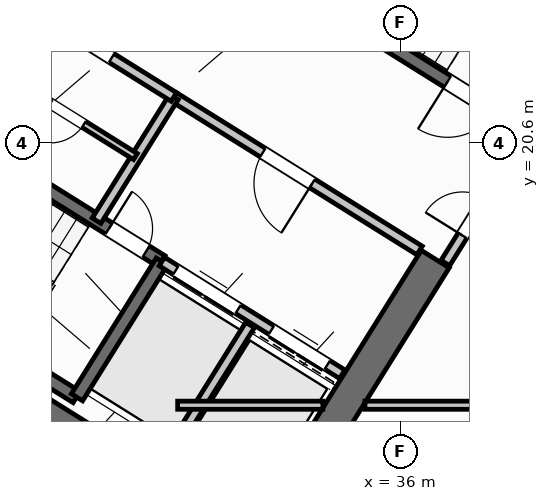
"""IFC4 building model, lengths in metres.
Left out: names, types, materials, properties, quantities, classifications, styles, units other than length and angle.
Written with IfcOpenShell. Run it as: python <this file> out.ifc"""

import sys

from ifc_helpers import new_model, si_unit, direction, frame, frame_2d, origin, place, context, subcontext, project, spatial, rectangle, extrude, source, transform, mapped, element, fill, save


model = new_model("IFC4")
c1 = context("Model", 3, precision=1e-05, world=origin(), true_north=direction((0.0, 1.0)))
c2 = subcontext(c1, "Body", "Model", "MODEL_VIEW")
j1 = project(units=[si_unit("LENGTHUNIT", "METRE"), si_unit("PLANEANGLEUNIT", "RADIAN")], contexts=[c1])
p1 = place(None, origin())
s1 = spatial("IfcSite", under=j1, at=p1, CompositionType="ELEMENT")
p2 = place(p1, origin())
s2 = spatial("IfcBuilding", under=s1, at=p2, CompositionType="ELEMENT")
p3 = place(p2, frame((0.0, 0.0, 67.2)))
s3 = spatial("IfcBuildingStorey", under=s2, at=p3, CompositionType="ELEMENT", Elevation=67.2)
p4 = place(p3, frame((33.409, 12.45, 0.0), z_axis=(0.0, 0.0, 1.0), x_axis=(-0.848051132073, 0.529914405721, 0.0)))
e1 = element("IfcWall", 1, at=p4, inside=s3, PredefinedType="SHEAR", context=c2, shape_type="SweptSolid", body=[
    extrude(rectangle(XDim=13.24, YDim=0.65, at=frame_2d((6.62, 0.0))), origin(), (0.0, 0.0, 1.0), 4.22),
])
p5 = place(p3, frame((36.683, 18.304, 0.0), z_axis=(0.0, 0.0, 1.0), x_axis=(-0.529899109053, -0.848060690178, 0.0)))
e2 = element("IfcWall", 2, at=p5, inside=s3, PredefinedType="SHEAR", context=c2, shape_type="SweptSolid", body=[
    extrude(rectangle(XDim=6.375, YDim=0.65, at=frame_2d((3.188, 0.0))), origin(), (0.0, 0.0, 1.0), 4.22),
])
p6 = place(p3, frame((29.268, 6.429, 0.0), z_axis=(0.0, 0.0, 1.0), x_axis=(-0.848049971435, 0.529916263149, 0.0)))
e3 = element("IfcWall", 3, at=p6, inside=s3, PredefinedType="STANDARD", context=c2, shape_type="SweptSolid", body=[
    extrude(rectangle(XDim=31.588, YDim=0.32, at=frame_2d((15.794, 0.0))), origin(), (0.0, 0.0, 1.0), 4.22),
])
p7 = place(p6, frame((16.362, 0.0, 0.0)))
e4 = element("IfcOpeningElement", 4, at=p7, cuts=e3, PredefinedType="OPENING", context=c2, shape_type="SweptSolid", body=[
    extrude(rectangle(XDim=1.2, YDim=2.15, at=frame_2d((0.6, 1.075))), frame((0.0, 0.17, 0.0), z_axis=(0.0, -1.0, 0.0), x_axis=(1.0, 0.0, 0.0)), (0.0, 0.0, 1.0), 0.34),
])
p8 = place(p6, frame((2.989, 0.0, 0.8)))
e5 = element("IfcOpeningElement", 5, at=p8, cuts=e3, PredefinedType="OPENING", context=c2, shape_type="SweptSolid", body=[
    extrude(rectangle(XDim=2.1, YDim=1.55, at=frame_2d((1.05, 0.775))), frame((0.0, 0.17, 0.0), z_axis=(0.0, -1.0, 0.0), x_axis=(1.0, 0.0, 0.0)), (0.0, 0.0, 1.0), 0.34),
])
p9 = place(p6, frame((8.359, 0.0, 0.8)))
e6 = element("IfcOpeningElement", 6, at=p9, cuts=e3, PredefinedType="OPENING", context=c2, shape_type="SweptSolid", body=[
    extrude(rectangle(XDim=2.1, YDim=1.55, at=frame_2d((1.05, 0.775))), frame((0.0, 0.17, 0.0), z_axis=(0.0, -1.0, 0.0), x_axis=(1.0, 0.0, 0.0)), (0.0, 0.0, 1.0), 0.34),
])
p10 = place(p6, frame((13.284, 0.0, 0.95)))
e7 = element("IfcOpeningElement", 7, at=p10, cuts=e3, PredefinedType="OPENING", context=c2, shape_type="SweptSolid", body=[
    extrude(rectangle(XDim=1.2, YDim=1.4, at=frame_2d((0.6, 0.7))), frame((0.0, 0.17, 0.0), z_axis=(0.0, -1.0, 0.0), x_axis=(1.0, 0.0, 0.0)), (0.0, 0.0, 1.0), 0.34),
])
p11 = place(p6, frame((29.188, 0.0, 0.95)))
e8 = element("IfcOpeningElement", 8, at=p11, cuts=e3, PredefinedType="OPENING", context=c2, shape_type="SweptSolid", body=[
    extrude(rectangle(XDim=1.2, YDim=1.4, at=frame_2d((0.6, 0.7))), frame((0.0, 0.17, 0.0), z_axis=(0.0, -1.0, 0.0), x_axis=(1.0, 0.0, 0.0)), (0.0, 0.0, 1.0), 0.34),
])
p12 = place(p6, frame((19.11, 0.0, 1.0)))
e9 = element("IfcOpeningElement", 9, at=p12, cuts=e3, PredefinedType="OPENING", context=c2, shape_type="SweptSolid", body=[
    extrude(rectangle(XDim=0.9, YDim=1.25, at=frame_2d((0.45, 0.625))), frame((0.0, 0.17, 0.0), z_axis=(0.0, -1.0, 0.0), x_axis=(1.0, 0.0, 0.0)), (0.0, 0.0, 1.0), 0.34),
])
p13 = place(p6, frame((21.226, 0.0, 1.0)))
e10 = element("IfcOpeningElement", 10, at=p13, cuts=e3, PredefinedType="OPENING", context=c2, shape_type="SweptSolid", body=[
    extrude(rectangle(XDim=0.9, YDim=1.25, at=frame_2d((0.45, 0.625))), frame((0.0, 0.17, 0.0), z_axis=(0.0, -1.0, 0.0), x_axis=(1.0, 0.0, 0.0)), (0.0, 0.0, 1.0), 0.34),
])
p14 = place(p6, frame((23.014, 0.0, 1.0)))
e11 = element("IfcOpeningElement", 11, at=p14, cuts=e3, PredefinedType="OPENING", context=c2, shape_type="SweptSolid", body=[
    extrude(rectangle(XDim=0.9, YDim=1.25, at=frame_2d((0.45, 0.625))), frame((0.0, 0.17, 0.0), z_axis=(0.0, -1.0, 0.0), x_axis=(1.0, 0.0, 0.0)), (0.0, 0.0, 1.0), 0.34),
])
p15 = place(p6, frame((24.802, 0.0, 1.0)))
e12 = element("IfcOpeningElement", 12, at=p15, cuts=e3, PredefinedType="OPENING", context=c2, shape_type="SweptSolid", body=[
    extrude(rectangle(XDim=0.9, YDim=1.25, at=frame_2d((0.45, 0.625))), frame((0.0, 0.17, 0.0), z_axis=(0.0, -1.0, 0.0), x_axis=(1.0, 0.0, 0.0)), (0.0, 0.0, 1.0), 0.34),
])
p16 = place(p6, frame((26.59, 0.0, 1.0)))
e13 = element("IfcOpeningElement", 13, at=p16, cuts=e3, PredefinedType="OPENING", context=c2, shape_type="SweptSolid", body=[
    extrude(rectangle(XDim=0.9, YDim=1.25, at=frame_2d((0.45, 0.625))), frame((0.0, 0.17, 0.0), z_axis=(0.0, -1.0, 0.0), x_axis=(1.0, 0.0, 0.0)), (0.0, 0.0, 1.0), 0.34),
])
p17 = place(p3, frame((29.605, 15.581, 0.0), z_axis=(0.0, 0.0, 1.0), x_axis=(-0.848036911448, 0.529937163087, 0.0)))
e14 = element("IfcWall", 14, at=p17, inside=s3, PredefinedType="SHEAR", context=c2, shape_type="SweptSolid", body=[
    extrude(rectangle(XDim=7.46, YDim=0.26, at=frame_2d((3.73, 0.0))), origin(), (0.0, 0.0, 1.0), 4.22),
])
p18 = place(p3, frame((31.28, 18.261, 0.0), z_axis=(0.0, 0.0, 1.0), x_axis=(-0.848051618787, 0.529913626805, 0.0)))
e15 = element("IfcWall", 15, at=p18, inside=s3, PredefinedType="SHEAR", context=c2, shape_type="SweptSolid", body=[
    extrude(rectangle(XDim=7.46, YDim=0.26, at=frame_2d((3.73, 0.0))), origin(), (0.0, 0.0, 1.0), 4.22),
])
p19 = place(p18, frame((0.36, 0.0, 0.0)))
e16 = element("IfcOpeningElement", 16, at=p19, cuts=e15, PredefinedType="OPENING", context=c2, shape_type="SweptSolid", body=[
    extrude(rectangle(XDim=0.86, YDim=2.05, at=frame_2d((0.43, 1.025))), frame((0.0, 0.14, 0.0), z_axis=(0.0, -1.0, 0.0), x_axis=(1.0, 0.0, 0.0)), (0.0, 0.0, 1.0), 0.28),
])
p20 = place(p3, frame((31.288, 18.256, 0.0), z_axis=(0.0, 0.0, 1.0), x_axis=(-0.529943379326, -0.848033026897, 0.0)))
e17 = element("IfcWall", 17, at=p20, inside=s3, PredefinedType="SHEAR", context=c2, shape_type="SweptSolid", body=[
    extrude(rectangle(XDim=3.16, YDim=0.26, at=frame_2d((1.58, 0.0))), origin(), (0.0, 0.0, 1.0), 4.22),
])
p21 = place(p3, frame((38.046, 21.108, 0.0), z_axis=(0.0, 0.0, 1.0), x_axis=(-0.848054434086, 0.529909121291, 0.0)))
e18 = element("IfcWall", 18, at=p21, inside=s3, PredefinedType="SHEAR", context=c2, shape_type="SweptSolid", body=[
    extrude(rectangle(XDim=7.33, YDim=0.26, at=frame_2d((3.665, 0.0))), origin(), (0.0, 0.0, 1.0), 4.22),
])
p22 = place(p21, frame((0.22, 0.0, 0.0)))
e19 = element("IfcOpeningElement", 19, at=p22, cuts=e18, PredefinedType="OPENING", context=c2, shape_type="SweptSolid", body=[
    extrude(rectangle(XDim=1.1, YDim=2.1, at=frame_2d((0.55, 1.05))), frame((0.0, 0.14, 0.0), z_axis=(0.0, -1.0, 0.0), x_axis=(1.0, 0.0, 0.0)), (0.0, 0.0, 1.0), 0.28),
])
p23 = place(p3, frame((34.848, 16.031, 0.0), z_axis=(0.0, 0.0, 1.0), x_axis=(-0.848044042236, 0.529925751807, 0.0)))
e20 = element("IfcWall", 20, at=p23, inside=s3, PredefinedType="STANDARD", context=c2, shape_type="SweptSolid", body=[
    extrude(rectangle(XDim=4.198, YDim=0.2, at=frame_2d((2.099, 0.0))), origin(), (0.0, 0.0, 1.0), 4.21),
])
p24 = place(p23, frame((0.348, 0.0, 0.0)))
e21 = element("IfcOpeningElement", 21, at=p24, cuts=e20, PredefinedType="OPENING", context=c2, shape_type="SweptSolid", body=[
    extrude(rectangle(XDim=1.3, YDim=2.2, at=frame_2d((0.65, 1.1))), frame((0.0, 0.11, 0.0), z_axis=(0.0, -1.0, 0.0), x_axis=(1.0, 0.0, 0.0)), (0.0, 0.0, 1.0), 0.22),
])
p25 = place(p23, frame((2.423, 0.0, 0.0)))
e22 = element("IfcOpeningElement", 22, at=p25, cuts=e20, PredefinedType="OPENING", context=c2, shape_type="SweptSolid", body=[
    extrude(rectangle(XDim=1.45, YDim=2.25, at=frame_2d((0.725, 1.125))), frame((0.0, 0.11, 0.0), z_axis=(0.0, -1.0, 0.0), x_axis=(1.0, 0.0, 0.0)), (0.0, 0.0, 1.0), 0.22),
])
p26 = place(p3, frame((36.374, 18.474, 0.0), z_axis=(0.0, 0.0, 1.0), x_axis=(-0.848051071577, 0.529914502535, 0.0)))
e23 = element("IfcWall", 23, at=p26, inside=s3, PredefinedType="STANDARD", context=c2, shape_type="SweptSolid", body=[
    extrude(rectangle(XDim=5.718, YDim=0.2, at=frame_2d((2.859, 0.0))), origin(), (0.0, 0.0, 1.0), 4.21),
])
p27 = place(p26, frame((2.498, 0.0, 0.0)))
e24 = element("IfcOpeningElement", 24, at=p27, cuts=e23, PredefinedType="OPENING", context=c2, shape_type="SweptSolid", body=[
    extrude(rectangle(XDim=1.15, YDim=2.1, at=frame_2d((0.575, 1.05))), frame((0.0, 0.11, 0.0), z_axis=(0.0, -1.0, 0.0), x_axis=(1.0, 0.0, 0.0)), (0.0, 0.0, 1.0), 0.22),
])
p28 = place(p3, frame((33.029, 17.003, 0.0), z_axis=(0.0, 0.0, 1.0), x_axis=(-0.529916267533, -0.848049968695, 0.0)))
e25 = element("IfcWall", 25, at=p28, inside=s3, PredefinedType="STANDARD", context=c2, shape_type="SweptSolid", body=[
    extrude(rectangle(XDim=2.92, YDim=0.2, at=frame_2d((1.46, 0.0))), origin(), (0.0, 0.0, 1.0), 4.21),
])
p29 = place(p3, frame((31.525, 21.504, 0.0), z_axis=(0.0, 0.0, 1.0), x_axis=(-0.529907497854, -0.848055448493, 0.0)))
e26 = element("IfcWall", 26, at=p29, inside=s3, PredefinedType="STANDARD", context=c2, shape_type="SweptSolid", body=[
    extrude(rectangle(XDim=2.88, YDim=0.2, at=frame_2d((1.44, 0.0))), origin(), (0.0, 0.0, 1.0), 4.21),
])
p30 = place(p3, frame((31.525, 21.504, 0.0), z_axis=(0.0, 0.0, 1.0), x_axis=(-0.848044998614, 0.529924221305, 0.0)))
e27 = element("IfcWall", 27, at=p30, inside=s3, PredefinedType="STANDARD", context=c2, shape_type="SweptSolid", body=[
    extrude(rectangle(XDim=6.168, YDim=0.2, at=frame_2d((3.084, 0.0))), origin(), (0.0, 0.0, 1.0), 4.21),
])
p31 = place(p30, frame((4.4, 0.0, 0.0)))
e28 = element("IfcOpeningElement", 28, at=p31, cuts=e27, PredefinedType="OPENING", context=c2, shape_type="SweptSolid", body=[
    extrude(rectangle(XDim=0.86, YDim=2.05, at=frame_2d((0.43, 1.025))), frame((0.0, 0.11, 0.0), z_axis=(0.0, -1.0, 0.0), x_axis=(1.0, 0.0, 0.0)), (0.0, 0.0, 1.0), 0.22),
])
p32 = place(p30, frame((1.45, 0.0, 0.0)))
e29 = element("IfcOpeningElement", 29, at=p32, cuts=e27, PredefinedType="OPENING", context=c2, shape_type="SweptSolid", body=[
    extrude(rectangle(XDim=0.86, YDim=2.05, at=frame_2d((0.43, 1.025))), frame((0.0, 0.11, 0.0), z_axis=(0.0, -1.0, 0.0), x_axis=(1.0, 0.0, 0.0)), (0.0, 0.0, 1.0), 0.22),
])
p33 = place(p3, frame((30.766, 20.327, 0.0), z_axis=(0.0, 0.0, 1.0), x_axis=(-0.848052663127, 0.529911955482, 0.0)))
e30 = element("IfcWall", 30, at=p33, inside=s3, PredefinedType="PLUMBINGWALL", context=c2, shape_type="SweptSolid", body=[
    extrude(rectangle(XDim=3.28, YDim=0.14, at=frame_2d((1.64, 0.0))), origin(), (0.0, 0.0, 1.0), 4.21),
])
p34 = place(p33, frame((1.2, 0.0, 0.0)))
e31 = element("IfcOpeningElement", 31, at=p34, cuts=e30, PredefinedType="OPENING", context=c2, shape_type="SweptSolid", body=[
    extrude(rectangle(XDim=0.78, YDim=2.05, at=frame_2d((0.39, 1.025))), frame((0.0, 0.08, 0.0), z_axis=(0.0, -1.0, 0.0), x_axis=(1.0, 0.0, 0.0)), (0.0, 0.0, 1.0), 0.16),
])
p35 = place(p3, frame((32.164, 10.374, 0.0), z_axis=(0.0, 0.0, 1.0), x_axis=(-0.848044107957, 0.529925646633, 0.0)))
e32 = element("IfcWall", 32, at=p35, inside=s3, PredefinedType="PARTITIONING", context=c2, shape_type="SweptSolid", body=[
    extrude(rectangle(XDim=15.57, YDim=0.16, at=frame_2d((7.785, 0.0))), origin(), (0.0, 0.0, 1.0), 4.21),
])
p36 = place(p35, frame((10.83, 0.0, 0.0)))
e33 = element("IfcOpeningElement", 33, at=p36, cuts=e32, PredefinedType="OPENING", context=c2, shape_type="SweptSolid", body=[
    extrude(rectangle(XDim=1.0, YDim=2.1, at=frame_2d((0.5, 1.05))), frame((0.0, 0.09, 0.0), z_axis=(0.0, -1.0, 0.0), x_axis=(1.0, 0.0, 0.0)), (0.0, 0.0, 1.0), 0.18),
])
p37 = place(p3, frame((29.72, 8.859, 0.0), z_axis=(0.0, 0.0, 1.0), x_axis=(-0.848049134363, 0.529917602752, 0.0)))
e34 = element("IfcWall", 34, at=p37, inside=s3, PredefinedType="PLUMBINGWALL", context=c2, shape_type="SweptSolid", body=[
    extrude(rectangle(XDim=14.3, YDim=0.14, at=frame_2d((7.15, 0.0))), origin(), (0.0, 0.0, 1.0), 4.21),
])
p38 = place(p37, frame((9.57, 0.0, 0.0)))
e35 = element("IfcOpeningElement", 35, at=p38, cuts=e34, PredefinedType="OPENING", context=c2, shape_type="SweptSolid", body=[
    extrude(rectangle(XDim=0.92, YDim=2.08, at=frame_2d((0.46, 1.04))), frame((0.0, 0.08, 0.0), z_axis=(0.0, -1.0, 0.0), x_axis=(1.0, 0.0, 0.0)), (0.0, 0.0, 1.0), 0.16),
])
p39 = place(p3, frame((38.451, 20.737, 0.0), z_axis=(0.0, 0.0, 1.0), x_axis=(-0.529924799939, -0.848044637038, 0.0)))
e36 = element("IfcWall", 36, at=p39, inside=s3, PredefinedType="STANDARD", context=c2, shape_type="SweptSolid", body=[
    extrude(rectangle(XDim=2.96, YDim=0.2, at=frame_2d((1.48, 0.0))), origin(), (0.0, 0.0, 1.0), 2.395),
])
p40 = place(p39, frame((1.46, 0.0, 0.0)))
e37 = element("IfcOpeningElement", 37, at=p40, cuts=e36, PredefinedType="OPENING", context=c2, shape_type="SweptSolid", body=[
    extrude(rectangle(XDim=0.86, YDim=2.05, at=frame_2d((0.43, 1.025))), frame((0.0, 0.11, 0.0), z_axis=(0.0, -1.0, 0.0), x_axis=(1.0, 0.0, 0.0)), (0.0, 0.0, 1.0), 0.22),
])
p41 = place(p3, frame((31.6, 15.42, 0.0), z_axis=(0.0, 0.0, 1.0), x_axis=(1.0, 0.0, 0.0)))
e38 = element("IfcWall", 38, at=p41, inside=s3, PredefinedType="PARTITIONING", context=c2, shape_type="SweptSolid", body=[
    extrude(rectangle(XDim=2.866, YDim=0.16, at=frame_2d((1.433, 0.0))), origin(), (0.0, 0.0, 1.0), 4.21),
])
p42 = place(p3, frame((35.296, 15.42, 0.0), z_axis=(0.0, 0.0, 1.0), x_axis=(1.0, 0.0, 0.0)))
e39 = element("IfcWall", 39, at=p42, inside=s3, PredefinedType="PARTITIONING", context=c2, shape_type="SweptSolid", body=[
    extrude(rectangle(XDim=15.311, YDim=0.16, at=frame_2d((7.655, 0.0))), origin(), (0.0, 0.0, 1.0), 4.21),
])
p43 = place(p42, frame((3.176, 0.0, 0.0)))
e40 = element("IfcOpeningElement", 40, at=p43, cuts=e39, PredefinedType="OPENING", context=c2, shape_type="SweptSolid", body=[
    extrude(rectangle(XDim=1.0, YDim=2.1, at=frame_2d((0.5, 1.05))), frame((0.0, 0.09, 0.0), z_axis=(0.0, -1.0, 0.0), x_axis=(1.0, 0.0, 0.0)), (0.0, 0.0, 1.0), 0.18),
])
m1 = source(origin(), c2, "Body", "SweptSolid", [
    extrude(rectangle(XDim=0.86, YDim=2.05, at=frame_2d((0.43, 1.025))), frame((0.0, 0.025, 0.0), z_axis=(0.0, -1.0, 0.0), x_axis=(1.0, 0.0, 0.0)), (0.0, 0.0, 1.0), 0.05),
])
p44 = place(p19, frame((0.86, 0.0, 0.0), z_axis=(0.0, 0.0, 1.0), x_axis=(-1.0, 0.0, 0.0)))
e41 = element("IfcDoor", 41, at=p44, inside=s3, OperationType="SINGLE_SWING_LEFT", PredefinedType="DOOR", context=c2, shape_type="MappedRepresentation", body=[
    mapped(m1, transform((0.0, 0.0, 0.0), scale=1.0)),
])
fill(e16, e41)
m2 = source(origin(), c2, "Body", "SweptSolid", [
    extrude(rectangle(XDim=1.1, YDim=2.1, at=frame_2d((0.55, 1.05))), frame((0.0, 0.025, 0.0), z_axis=(0.0, -1.0, 0.0), x_axis=(1.0, 0.0, 0.0)), (0.0, 0.0, 1.0), 0.05),
])
p45 = place(p22, origin())
e42 = element("IfcDoor", 42, at=p45, inside=s3, OperationType="SINGLE_SWING_RIGHT", PredefinedType="DOOR", context=c2, shape_type="MappedRepresentation", body=[
    mapped(m2, transform((0.0, 0.0, 0.0), scale=1.0)),
])
fill(e19, e42)
m3 = source(origin(), c2, "Body", "SweptSolid", [
    extrude(rectangle(XDim=1.15, YDim=2.1, at=frame_2d((0.575, 1.05))), frame((0.0, 0.025, 0.0), z_axis=(0.0, -1.0, 0.0), x_axis=(1.0, 0.0, 0.0)), (0.0, 0.0, 1.0), 0.05),
])
p46 = place(p27, origin())
e43 = element("IfcDoor", 43, at=p46, inside=s3, OperationType="SINGLE_SWING_LEFT", PredefinedType="DOOR", context=c2, shape_type="MappedRepresentation", body=[
    mapped(m3, transform((0.0, 0.0, 0.0), scale=1.0)),
])
fill(e24, e43)
m4 = source(origin(), c2, "Body", "SweptSolid", [
    extrude(rectangle(XDim=1.3, YDim=2.2, at=frame_2d((0.65, 1.1))), frame((0.0, 0.025, 0.0), z_axis=(0.0, -1.0, 0.0), x_axis=(1.0, 0.0, 0.0)), (0.0, 0.0, 1.0), 0.05),
])
p47 = place(p24, origin())
e44 = element("IfcDoor", 44, at=p47, inside=s3, OperationType="DOUBLE_DOOR_SLIDING", PredefinedType="DOOR", context=c2, shape_type="MappedRepresentation", body=[
    mapped(m4, transform((0.0, 0.0, 0.0), scale=1.0)),
])
fill(e21, e44)
m5 = source(origin(), c2, "Body", "SweptSolid", [
    extrude(rectangle(XDim=1.45, YDim=2.25, at=frame_2d((0.725, 1.125))), frame((0.0, 0.025, 0.0), z_axis=(0.0, -1.0, 0.0), x_axis=(1.0, 0.0, 0.0)), (0.0, 0.0, 1.0), 0.05),
])
p48 = place(p25, origin())
e45 = element("IfcDoor", 45, at=p48, inside=s3, OperationType="DOUBLE_DOOR_SLIDING", PredefinedType="DOOR", context=c2, shape_type="MappedRepresentation", body=[
    mapped(m5, transform((0.0, 0.0, 0.0), scale=1.0)),
])
fill(e22, e45)
p49 = place(p32, frame((0.86, 0.0, 0.0), z_axis=(0.0, 0.0, 1.0), x_axis=(-1.0, 0.0, 0.0)))
e46 = element("IfcDoor", 46, at=p49, inside=s3, OperationType="SINGLE_SWING_LEFT", PredefinedType="DOOR", context=c2, shape_type="MappedRepresentation", body=[
    mapped(m1, transform((0.0, 0.0, 0.0), scale=1.0)),
])
fill(e29, e46)
m6 = source(origin(), c2, "Body", "SweptSolid", [
    extrude(rectangle(XDim=0.78, YDim=2.05, at=frame_2d((0.39, 1.025))), frame((0.0, 0.025, 0.0), z_axis=(0.0, -1.0, 0.0), x_axis=(1.0, 0.0, 0.0)), (0.0, 0.0, 1.0), 0.05),
])
p50 = place(p34, origin())
e47 = element("IfcDoor", 47, at=p50, inside=s3, OperationType="SINGLE_SWING_RIGHT", PredefinedType="DOOR", context=c2, shape_type="MappedRepresentation", body=[
    mapped(m6, transform((0.0, 0.0, 0.0), scale=1.0)),
])
fill(e31, e47)
p51 = place(p40, frame((0.86, 0.0, 0.0), z_axis=(0.0, 0.0, 1.0), x_axis=(-1.0, 0.0, 0.0)))
e48 = element("IfcDoor", 48, at=p51, inside=s3, OperationType="SINGLE_SWING_LEFT", PredefinedType="DOOR", context=c2, shape_type="MappedRepresentation", body=[
    mapped(m1, transform((0.0, 0.0, 0.0), scale=1.0)),
])
fill(e37, e48)
save(model, sys.argv[1])
